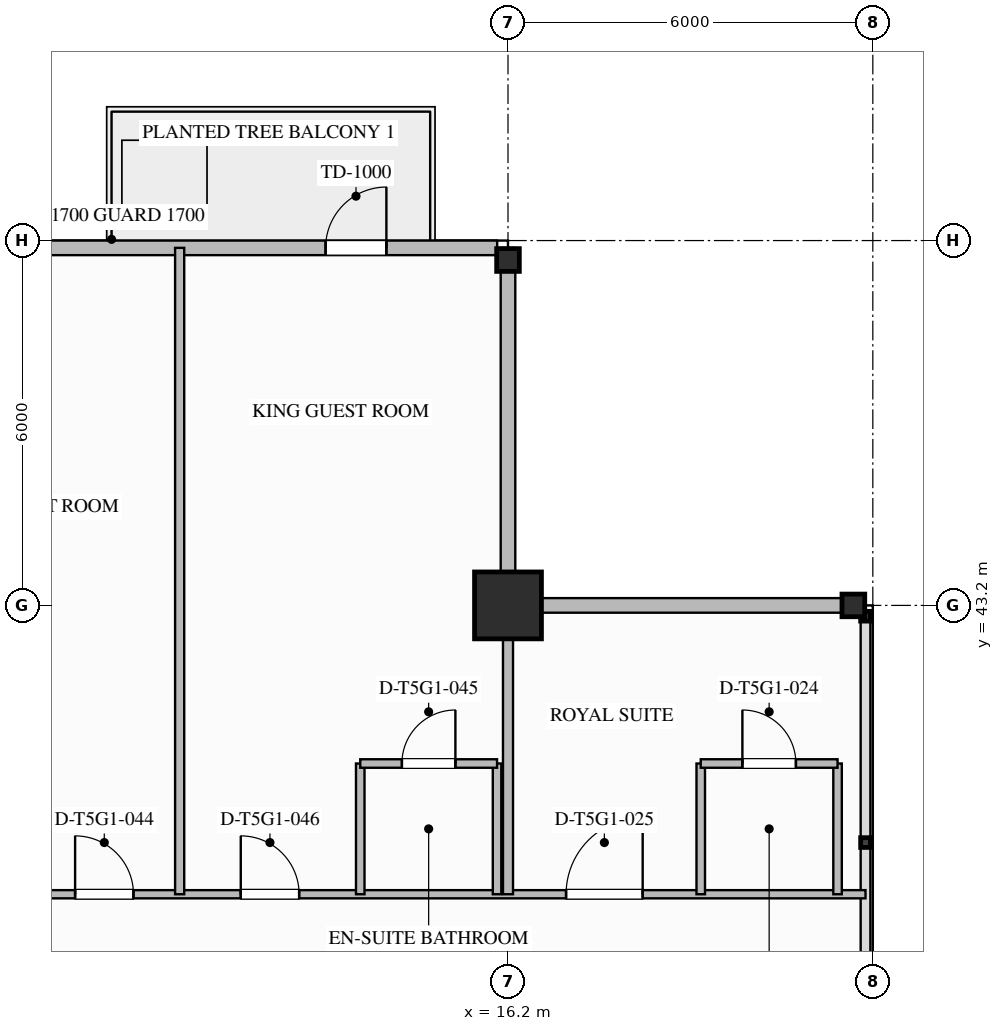
"""IFC4 building model, lengths in metres.
Left out: names, types, materials, properties, quantities, classifications, styles, units other than length and angle.
Written with IfcOpenShell. Run it as: python <this file> out.ifc"""

import sys

from ifc_helpers import new_model, si_unit, direction, frame, frame_2d, origin, origin_2d, place, context, subcontext, project, spatial, rectangle, i_section, extrude, element, fill, save


model = new_model("IFC4")
c1 = context("Model", 3, precision=1e-05, world=origin(), true_north=direction((0.0, 1.0)))
c2 = subcontext(c1, "Body", "Model", "MODEL_VIEW")
j1 = project(units=[si_unit("LENGTHUNIT", "METRE"), si_unit("PLANEANGLEUNIT", "RADIAN")], contexts=[c1])
p1 = place(None, origin())
s1 = spatial("IfcSite", under=j1, at=p1, CompositionType="ELEMENT")
p2 = place(p1, origin())
s2 = spatial("IfcBuilding", under=s1, at=p2, CompositionType="ELEMENT")
p3 = place(p2, frame((0.0, 0.0, 268.65)))
s3 = spatial("IfcBuildingStorey", under=s2, at=p3, CompositionType="ELEMENT", Elevation=268.65)
p4 = place(p3, frame((16.2, 43.2, 0.0), z_axis=(0.0, 0.0, 1.0), x_axis=(1.0, 0.0, 0.0)))
e1 = element("IfcColumn", 1, at=p4, inside=s3, PredefinedType="COLUMN", context=c2, shape_type="SweptSolid", body=[
    extrude(rectangle(XDim=1.1, YDim=1.1, at=origin_2d()), origin(), (0.0, 0.0, 1.0), 3.65),
])
for number, where, z_axis, x_axis in (
    (2, (21.88, 43.2, 0.0), (0.0, 0.0, 1.0), (1.0, 0.0, 0.0)),
    (3, (16.2, 48.88, 0.0), (0.0, 0.0, 1.0), (0.0, 1.0, 0.0)),
):
    element("IfcColumn", number, at=place(p3, frame(where, z_axis=z_axis, x_axis=x_axis)), inside=s3, PredefinedType="COLUMN", context=c2, shape_type="SweptSolid", body=[
        extrude(i_section(OverallWidth=0.374, OverallDepth=0.372, WebThickness=0.016, FlangeThickness=0.026, FilletRadius=0.025, at=origin_2d()), origin(), (0.0, 0.0, 1.0), 3.647),
    ])
p5 = place(p3, frame((8.578, 49.08, 0.0), z_axis=(0.0, 0.0, 1.0), x_axis=(1.0, 0.0, 0.0)))
e4 = element("IfcWall", 4, at=p5, inside=s3, PredefinedType="STANDARD", context=c2, shape_type="SweptSolid", body=[
    extrude(rectangle(XDim=7.444, YDim=0.24, at=frame_2d((3.722, 0.0))), origin(), (0.0, 0.0, 1.0), 2.854),
])
p6 = place(p5, frame((4.622, 0.0, 0.0)))
e5 = element("IfcOpeningElement", 5, at=p6, cuts=e4, PredefinedType="OPENING", context=c2, shape_type="SweptSolid", body=[
    extrude(rectangle(XDim=1.0, YDim=2.2, at=frame_2d((0.5, 1.1))), frame((0.0, 0.13, 0.0), z_axis=(0.0, -1.0, 0.0), x_axis=(1.0, 0.0, 0.0)), (0.0, 0.0, 1.0), 0.26),
])
for number, where, z_axis, x_axis in (
    (6, (16.2, 49.08, 0.0), (0.0, 0.0, 1.0), (0.0, -1.0, 0.0)),
    (7, (16.2, 43.2, 0.0), (0.0, 0.0, 1.0), (1.0, 0.0, 0.0)),
):
    element("IfcWall", number, at=place(p3, frame(where, z_axis=z_axis, x_axis=x_axis)), inside=s3, PredefinedType="STANDARD", context=c2, shape_type="SweptSolid", body=[
        extrude(rectangle(XDim=5.88, YDim=0.24, at=frame_2d((2.94, 0.0))), origin(), (0.0, 0.0, 1.0), 2.779),
    ])
p7 = place(p3, frame((-16.2, 38.45, 0.0), z_axis=(0.0, 0.0, 1.0), x_axis=(1.0, 0.0, 0.0)))
e8 = element("IfcWall", 8, at=p7, inside=s3, PredefinedType="PARTITIONING", context=c2, shape_type="SweptSolid", body=[
    extrude(rectangle(XDim=38.28, YDim=0.135, at=frame_2d((19.14, 0.0))), origin(), (0.0, 0.0, 1.0), 3.39),
])
p8 = place(p7, frame((33.355, 0.0, 0.0)))
e9 = element("IfcOpeningElement", 9, at=p8, cuts=e8, PredefinedType="OPENING", context=c2, shape_type="SweptSolid", body=[
    extrude(rectangle(XDim=1.26, YDim=2.2, at=frame_2d((0.63, 1.1))), frame((0.0, 0.077, 0.0), z_axis=(0.0, -1.0, 0.0), x_axis=(1.0, 0.0, 0.0)), (0.0, 0.0, 1.0), 0.155),
])
p9 = place(p7, frame((3.435, 0.0, 0.0)))
e10 = element("IfcOpeningElement", 10, at=p9, cuts=e8, PredefinedType="OPENING", context=c2, shape_type="SweptSolid", body=[
    extrude(rectangle(XDim=0.96, YDim=2.15, at=frame_2d((0.48, 1.075))), frame((0.0, 0.077, 0.0), z_axis=(0.0, -1.0, 0.0), x_axis=(1.0, 0.0, 0.0)), (0.0, 0.0, 1.0), 0.155),
])
p10 = place(p7, frame((6.16, 0.0, 0.0)))
e11 = element("IfcOpeningElement", 11, at=p10, cuts=e8, PredefinedType="OPENING", context=c2, shape_type="SweptSolid", body=[
    extrude(rectangle(XDim=0.96, YDim=2.15, at=frame_2d((0.48, 1.075))), frame((0.0, 0.077, 0.0), z_axis=(0.0, -1.0, 0.0), x_axis=(1.0, 0.0, 0.0)), (0.0, 0.0, 1.0), 0.155),
])
p11 = place(p7, frame((13.99, 0.0, 0.0)))
e12 = element("IfcOpeningElement", 12, at=p11, cuts=e8, PredefinedType="OPENING", context=c2, shape_type="SweptSolid", body=[
    extrude(rectangle(XDim=0.96, YDim=2.15, at=frame_2d((0.48, 1.075))), frame((0.0, 0.077, 0.0), z_axis=(0.0, -1.0, 0.0), x_axis=(1.0, 0.0, 0.0)), (0.0, 0.0, 1.0), 0.155),
])
p12 = place(p7, frame((17.45, 0.0, 0.0)))
e13 = element("IfcOpeningElement", 13, at=p12, cuts=e8, PredefinedType="OPENING", context=c2, shape_type="SweptSolid", body=[
    extrude(rectangle(XDim=0.96, YDim=2.15, at=frame_2d((0.48, 1.075))), frame((0.0, 0.077, 0.0), z_axis=(0.0, -1.0, 0.0), x_axis=(1.0, 0.0, 0.0)), (0.0, 0.0, 1.0), 0.155),
])
p13 = place(p7, frame((25.281, 0.0, 0.0)))
e14 = element("IfcOpeningElement", 14, at=p13, cuts=e8, PredefinedType="OPENING", context=c2, shape_type="SweptSolid", body=[
    extrude(rectangle(XDim=0.96, YDim=2.15, at=frame_2d((0.48, 1.075))), frame((0.0, 0.077, 0.0), z_axis=(0.0, -1.0, 0.0), x_axis=(1.0, 0.0, 0.0)), (0.0, 0.0, 1.0), 0.155),
])
p14 = place(p7, frame((28.005, 0.0, 0.0)))
e15 = element("IfcOpeningElement", 15, at=p14, cuts=e8, PredefinedType="OPENING", context=c2, shape_type="SweptSolid", body=[
    extrude(rectangle(XDim=0.96, YDim=2.15, at=frame_2d((0.48, 1.075))), frame((0.0, 0.077, 0.0), z_axis=(0.0, -1.0, 0.0), x_axis=(1.0, 0.0, 0.0)), (0.0, 0.0, 1.0), 0.155),
])
p15 = place(p3, frame((16.2, 38.45, 0.0), z_axis=(0.0, 0.0, 1.0), x_axis=(0.0, 1.0, 0.0)))
e16 = element("IfcWall", 16, at=p15, inside=s3, PredefinedType="PARTITIONING", context=c2, shape_type="SweptSolid", body=[
    extrude(rectangle(XDim=4.63, YDim=0.165, at=frame_2d((2.315, 0.0))), origin(), (0.0, 0.0, 1.0), 2.764),
])
for number, where, z_axis, x_axis in (
    (17, (19.37, 38.45, 0.0), (0.0, 0.0, 1.0), (0.0, 1.0, 0.0)),
    (18, (21.62, 38.45, 0.0), (0.0, 0.0, 1.0), (0.0, 1.0, 0.0)),
):
    element("IfcWall", number, at=place(p3, frame(where, z_axis=z_axis, x_axis=x_axis)), inside=s3, PredefinedType="PLUMBINGWALL", context=c2, shape_type="SweptSolid", body=[
        extrude(rectangle(XDim=2.15, YDim=0.14, at=frame_2d((1.075, 0.0))), origin(), (0.0, 0.0, 1.0), 3.39),
    ])
p16 = place(p3, frame((19.37, 40.6, 0.0), z_axis=(0.0, 0.0, 1.0), x_axis=(1.0, 0.0, 0.0)))
e19 = element("IfcWall", 19, at=p16, inside=s3, PredefinedType="PLUMBINGWALL", context=c2, shape_type="SweptSolid", body=[
    extrude(rectangle(XDim=2.25, YDim=0.14, at=frame_2d((1.125, 0.0))), origin(), (0.0, 0.0, 1.0), 3.39),
])
p17 = place(p16, frame((0.685, 0.0, 0.0)))
e20 = element("IfcOpeningElement", 20, at=p17, cuts=e19, PredefinedType="OPENING", context=c2, shape_type="SweptSolid", body=[
    extrude(rectangle(XDim=0.88, YDim=2.1, at=frame_2d((0.44, 1.05))), frame((0.0, 0.08, 0.0), z_axis=(0.0, -1.0, 0.0), x_axis=(1.0, 0.0, 0.0)), (0.0, 0.0, 1.0), 0.16),
])
p18 = place(p3, frame((10.8, 38.45, 0.0), z_axis=(0.0, 0.0, 1.0), x_axis=(0.0, 1.0, 0.0)))
e21 = element("IfcWall", 21, at=p18, inside=s3, PredefinedType="PARTITIONING", context=c2, shape_type="SweptSolid", body=[
    extrude(rectangle(XDim=10.63, YDim=0.15, at=frame_2d((5.315, 0.0))), origin(), (0.0, 0.0, 1.0), 3.39),
])
p19 = place(p3, frame((13.77, 38.45, 0.0), z_axis=(0.0, 0.0, 1.0), x_axis=(0.0, 1.0, 0.0)))
e22 = element("IfcWall", 22, at=p19, inside=s3, PredefinedType="PLUMBINGWALL", context=c2, shape_type="SweptSolid", body=[
    extrude(rectangle(XDim=2.15, YDim=0.14, at=frame_2d((1.075, 0.0))), origin(), (0.0, 0.0, 1.0), 3.39),
])
p20 = place(p3, frame((16.02, 38.45, 0.0), z_axis=(0.0, 0.0, 1.0), x_axis=(0.0, 1.0, 0.0)))
e23 = element("IfcWall", 23, at=p20, inside=s3, PredefinedType="PLUMBINGWALL", context=c2, shape_type="SweptSolid", body=[
    extrude(rectangle(XDim=2.15, YDim=0.14, at=frame_2d((1.075, 0.0))), origin(), (0.0, 0.0, 1.0), 2.764),
])
p21 = place(p3, frame((13.77, 40.6, 0.0), z_axis=(0.0, 0.0, 1.0), x_axis=(1.0, 0.0, 0.0)))
e24 = element("IfcWall", 24, at=p21, inside=s3, PredefinedType="PLUMBINGWALL", context=c2, shape_type="SweptSolid", body=[
    extrude(rectangle(XDim=2.25, YDim=0.14, at=frame_2d((1.125, 0.0))), origin(), (0.0, 0.0, 1.0), 3.39),
])
p22 = place(p21, frame((0.685, 0.0, 0.0)))
e25 = element("IfcOpeningElement", 25, at=p22, cuts=e24, PredefinedType="OPENING", context=c2, shape_type="SweptSolid", body=[
    extrude(rectangle(XDim=0.88, YDim=2.1, at=frame_2d((0.44, 1.05))), frame((0.0, 0.08, 0.0), z_axis=(0.0, -1.0, 0.0), x_axis=(1.0, 0.0, 0.0)), (0.0, 0.0, 1.0), 0.16),
])
p23 = place(p6, origin())
e26 = element("IfcDoor", 26, at=p23, inside=s3, OperationType="SINGLE_SWING_RIGHT", PredefinedType="DOOR", context=c2, shape_type="SweptSolid", body=[
    extrude(rectangle(XDim=1.0, YDim=2.2, at=frame_2d((0.5, 1.1))), frame((0.0, 0.025, 0.0), z_axis=(0.0, -1.0, 0.0), x_axis=(1.0, 0.0, 0.0)), (0.0, 0.0, 1.0), 0.05),
])
fill(e5, e26)
p24 = place(p17, origin())
e27 = element("IfcDoor", 27, at=p24, inside=s3, OperationType="SINGLE_SWING_LEFT", PredefinedType="DOOR", context=c2, shape_type="SweptSolid", body=[
    extrude(rectangle(XDim=0.88, YDim=2.1, at=frame_2d((0.44, 1.05))), frame((0.0, 0.025, 0.0), z_axis=(0.0, -1.0, 0.0), x_axis=(1.0, 0.0, 0.0)), (0.0, 0.0, 1.0), 0.05),
])
fill(e20, e27)
p25 = place(p8, origin())
e28 = element("IfcDoor", 28, at=p25, inside=s3, OperationType="SINGLE_SWING_RIGHT", PredefinedType="DOOR", context=c2, shape_type="SweptSolid", body=[
    extrude(rectangle(XDim=1.26, YDim=2.2, at=frame_2d((0.63, 1.1))), frame((0.0, 0.025, 0.0), z_axis=(0.0, -1.0, 0.0), x_axis=(1.0, 0.0, 0.0)), (0.0, 0.0, 1.0), 0.05),
])
fill(e9, e28)
p26 = place(p13, origin())
e29 = element("IfcDoor", 29, at=p26, inside=s3, OperationType="SINGLE_SWING_LEFT", PredefinedType="DOOR", context=c2, shape_type="SweptSolid", body=[
    extrude(rectangle(XDim=0.96, YDim=2.15, at=frame_2d((0.48, 1.075))), frame((0.0, 0.025, 0.0), z_axis=(0.0, -1.0, 0.0), x_axis=(1.0, 0.0, 0.0)), (0.0, 0.0, 1.0), 0.05),
])
fill(e14, e29)
p27 = place(p22, origin())
e30 = element("IfcDoor", 30, at=p27, inside=s3, OperationType="SINGLE_SWING_RIGHT", PredefinedType="DOOR", context=c2, shape_type="SweptSolid", body=[
    extrude(rectangle(XDim=0.88, YDim=2.1, at=frame_2d((0.44, 1.05))), frame((0.0, 0.025, 0.0), z_axis=(0.0, -1.0, 0.0), x_axis=(1.0, 0.0, 0.0)), (0.0, 0.0, 1.0), 0.05),
])
fill(e25, e30)
p28 = place(p14, origin())
e31 = element("IfcDoor", 31, at=p28, inside=s3, OperationType="SINGLE_SWING_LEFT", PredefinedType="DOOR", context=c2, shape_type="SweptSolid", body=[
    extrude(rectangle(XDim=0.96, YDim=2.15, at=frame_2d((0.48, 1.075))), frame((0.0, 0.025, 0.0), z_axis=(0.0, -1.0, 0.0), x_axis=(1.0, 0.0, 0.0)), (0.0, 0.0, 1.0), 0.05),
])
fill(e15, e31)
save(model, sys.argv[1])
